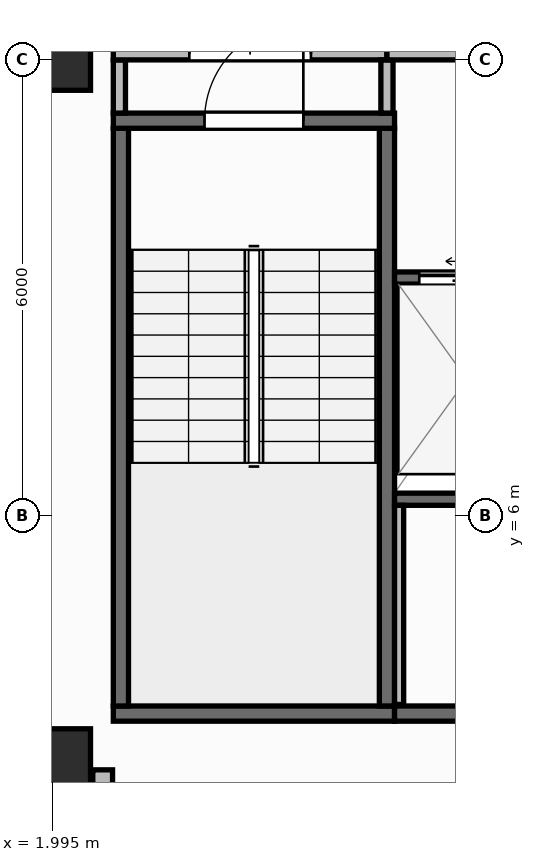
"""IFC4 building model, lengths in metres.
Left out: names, types, materials, properties, quantities, classifications, styles, units other than length and angle.
Written with IfcOpenShell. Run it as: python <this file> out.ifc"""

import sys

from ifc_helpers import new_model, si_unit, direction, frame, frame_2d, origin, origin_2d, place, context, subcontext, project, spatial, rectangle, extrude, element, fill, save


model = new_model("IFC4")
c1 = context("Model", 3, precision=1e-05, world=origin(), true_north=direction((0.0, 1.0)))
c2 = subcontext(c1, "Body", "Model", "MODEL_VIEW")
j1 = project(units=[si_unit("LENGTHUNIT", "METRE"), si_unit("PLANEANGLEUNIT", "RADIAN")], contexts=[c1])
p1 = place(None, origin())
s1 = spatial("IfcSite", under=j1, at=p1, CompositionType="ELEMENT")
p2 = place(p1, origin())
s2 = spatial("IfcBuilding", under=s1, at=p2, CompositionType="ELEMENT")
p3 = place(p2, frame((0.0, 0.0, 244.7)))
s3 = spatial("IfcBuildingStorey", under=s2, at=p3, CompositionType="ELEMENT", Elevation=244.7)
for number, where, z_axis, x_axis in (
    (1, (2.1, 2.8, 0.0), (0.0, 0.0, 1.0), (1.0, 0.0, 0.0)),
    (2, (2.1, 12.0, 0.0), (0.0, 0.0, 1.0), (1.0, 0.0, 0.0)),
):
    element("IfcColumn", number, at=place(p3, frame(where, z_axis=z_axis, x_axis=x_axis)), inside=s3, PredefinedType="COLUMN", context=c2, shape_type="SweptSolid", body=[
        extrude(rectangle(XDim=0.8, YDim=0.8, at=origin_2d()), origin(), (0.0, 0.0, 1.0), 3.95),
    ])
p4 = place(p3, frame((2.66, 2.66, 0.0), z_axis=(0.0, 0.0, 1.0), x_axis=(0.0, -1.0, 0.0)))
e3 = element("IfcWall", 3, at=p4, inside=s3, PredefinedType="STANDARD", context=c2, shape_type="SweptSolid", body=[
    extrude(rectangle(XDim=2.486, YDim=0.26, at=frame_2d((1.243, 0.0))), origin(), (0.0, 0.0, 1.0), 3.71),
])
p5 = place(p3, frame((2.66, 0.174, 0.0), z_axis=(0.0, 0.0, 1.0), x_axis=(0.996611813627, 0.082248969229, 0.0)))
e4 = element("IfcWall", 4, at=p5, inside=s3, PredefinedType="STANDARD", context=c2, shape_type="SweptSolid", body=[
    extrude(rectangle(XDim=41.019, YDim=0.26, at=frame_2d((20.51, 0.0))), origin(), (0.0, 0.0, 1.0), 3.71),
])
p6 = place(p5, frame((19.31, 0.0, 0.9)))
e5 = element("IfcOpeningElement", 5, at=p6, cuts=e4, PredefinedType="OPENING", context=c2, shape_type="SweptSolid", body=[
    extrude(rectangle(XDim=2.4, YDim=1.65, at=frame_2d((1.2, 0.825))), frame((0.0, 0.14, 0.0), z_axis=(0.0, -1.0, 0.0), x_axis=(1.0, 0.0, 0.0)), (0.0, 0.0, 1.0), 0.28),
])
p7 = place(p3, frame((2.8, 3.4, 0.0), z_axis=(0.0, 0.0, 1.0), x_axis=(1.0, 0.0, 0.0)))
e6 = element("IfcWall", 6, at=p7, inside=s3, PredefinedType="SHEAR", context=c2, shape_type="SweptSolid", body=[
    extrude(rectangle(XDim=3.7, YDim=0.2, at=frame_2d((1.85, 0.0))), origin(), (0.0, 0.0, 1.0), 3.71),
])
for number, where, z_axis, x_axis in (
    (7, (2.9, 3.5, 0.0), (0.0, 0.0, 1.0), (0.0, 1.0, 0.0)),
    (8, (6.4, 3.5, 0.0), (0.0, 0.0, 1.0), (0.0, 1.0, 0.0)),
):
    element("IfcWall", number, at=place(p3, frame(where, z_axis=z_axis, x_axis=x_axis)), inside=s3, PredefinedType="SHEAR", context=c2, shape_type="SweptSolid", body=[
        extrude(rectangle(XDim=7.6, YDim=0.2, at=frame_2d((3.8, 0.0))), origin(), (0.0, 0.0, 1.0), 3.71),
    ])
p8 = place(p3, frame((2.8, 11.2, 0.0), z_axis=(0.0, 0.0, 1.0), x_axis=(1.0, 0.0, 0.0)))
e9 = element("IfcWall", 9, at=p8, inside=s3, PredefinedType="SHEAR", context=c2, shape_type="SweptSolid", body=[
    extrude(rectangle(XDim=3.7, YDim=0.2, at=frame_2d((1.85, 0.0))), origin(), (0.0, 0.0, 1.0), 3.71),
])
p9 = place(p8, frame((1.2, 0.0, 0.0)))
e10 = element("IfcOpeningElement", 10, at=p9, cuts=e9, PredefinedType="OPENING", context=c2, shape_type="SweptSolid", body=[
    extrude(rectangle(XDim=1.3, YDim=2.15, at=frame_2d((0.65, 1.075))), frame((0.0, 0.11, 0.0), z_axis=(0.0, -1.0, 0.0), x_axis=(1.0, 0.0, 0.0)), (0.0, 0.0, 1.0), 0.22),
])
p10 = place(p3, frame((6.5, 3.4, 0.0), z_axis=(0.0, 0.0, 1.0), x_axis=(1.0, 0.0, 0.0)))
e11 = element("IfcWall", 11, at=p10, inside=s3, PredefinedType="SHEAR", context=c2, shape_type="SweptSolid", body=[
    extrude(rectangle(XDim=13.7, YDim=0.2, at=frame_2d((6.85, 0.0))), origin(), (0.0, 0.0, 1.0), 3.71),
])
p11 = place(p3, frame((6.5, 6.22, 0.0), z_axis=(0.0, 0.0, 1.0), x_axis=(1.0, 0.0, 0.0)))
e12 = element("IfcWall", 12, at=p11, inside=s3, PredefinedType="SHEAR", context=c2, shape_type="SweptSolid", body=[
    extrude(rectangle(XDim=12.11, YDim=0.16, at=frame_2d((6.055, 0.0))), origin(), (0.0, 0.0, 1.0), 3.71),
])
p12 = place(p3, frame((6.5, 9.13, 0.0), z_axis=(0.0, 0.0, 1.0), x_axis=(1.0, 0.0, 0.0)))
e13 = element("IfcWall", 13, at=p12, inside=s3, PredefinedType="SHEAR", context=c2, shape_type="SweptSolid", body=[
    extrude(rectangle(XDim=1.975, YDim=0.16, at=frame_2d((0.988, 0.0))), origin(), (0.0, 0.0, 1.0), 3.71),
])
p13 = place(p12, frame((0.325, 0.0, 0.0)))
e14 = element("IfcOpeningElement", 14, at=p13, cuts=e13, PredefinedType="OPENING", context=c2, shape_type="SweptSolid", body=[
    extrude(rectangle(XDim=1.25, YDim=2.15, at=frame_2d((0.625, 1.075))), frame((0.0, 0.09, 0.0), z_axis=(0.0, -1.0, 0.0), x_axis=(1.0, 0.0, 0.0)), (0.0, 0.0, 1.0), 0.18),
])
p14 = place(p3, frame((6.56, 3.52, 0.0), z_axis=(0.0, 0.0, 1.0), x_axis=(0.0, 1.0, 0.0)))
e15 = element("IfcWall", 15, at=p14, inside=s3, PredefinedType="PARTITIONING", context=c2, shape_type="SweptSolid", body=[
    extrude(rectangle(XDim=2.62, YDim=0.12, at=frame_2d((1.31, 0.0))), origin(), (0.0, 0.0, 1.0), 3.71),
])
p15 = place(p3, frame((2.88, 11.3, 0.0), z_axis=(0.0, 0.0, 1.0), x_axis=(0.0, 1.0, 0.0)))
e16 = element("IfcWall", 16, at=p15, inside=s3, PredefinedType="PARTITIONING", context=c2, shape_type="SweptSolid", body=[
    extrude(rectangle(XDim=0.7, YDim=0.16, at=frame_2d((0.35, 0.0))), origin(), (0.0, 0.0, 1.0), 3.71),
])
p16 = place(p3, frame((2.8, 12.08, 0.0), z_axis=(0.0, 0.0, 1.0), x_axis=(1.0, 0.0, 0.0)))
e17 = element("IfcWall", 17, at=p16, inside=s3, PredefinedType="PARTITIONING", context=c2, shape_type="SweptSolid", body=[
    extrude(rectangle(XDim=3.6, YDim=0.16, at=frame_2d((1.8, 0.0))), origin(), (0.0, 0.0, 1.0), 3.157),
])
p17 = place(p16, frame((1.0, 0.0, 0.0)))
e18 = element("IfcOpeningElement", 18, at=p17, cuts=e17, PredefinedType="OPENING", context=c2, shape_type="SweptSolid", body=[
    extrude(rectangle(XDim=1.6, YDim=2.05, at=frame_2d((0.8, 1.025))), frame((0.0, 0.09, 0.0), z_axis=(0.0, -1.0, 0.0), x_axis=(1.0, 0.0, 0.0)), (0.0, 0.0, 1.0), 0.18),
])
p18 = place(p3, frame((6.4, 11.3, 0.0), z_axis=(0.0, 0.0, 1.0), x_axis=(0.0, 1.0, 0.0)))
e19 = element("IfcWall", 19, at=p18, inside=s3, PredefinedType="PARTITIONING", context=c2, shape_type="SweptSolid", body=[
    extrude(rectangle(XDim=0.7, YDim=0.16, at=frame_2d((0.35, 0.0))), origin(), (0.0, 0.0, 1.0), 3.71),
])
p19 = place(p3, frame((6.4, 12.08, 0.0), z_axis=(0.0, 0.0, 1.0), x_axis=(1.0, 0.0, 0.0)))
e20 = element("IfcWall", 20, at=p19, inside=s3, PredefinedType="PARTITIONING", context=c2, shape_type="SweptSolid", body=[
    extrude(rectangle(XDim=6.18, YDim=0.16, at=frame_2d((3.09, 0.0))), origin(), (0.0, 0.0, 1.0), 3.157),
])
p20 = place(p19, frame((2.29, 0.0, 0.0)))
e21 = element("IfcOpeningElement", 21, at=p20, cuts=e20, PredefinedType="OPENING", context=c2, shape_type="SweptSolid", body=[
    extrude(rectangle(XDim=1.6, YDim=2.05, at=frame_2d((0.8, 1.025))), frame((0.0, 0.09, 0.0), z_axis=(0.0, -1.0, 0.0), x_axis=(1.0, 0.0, 0.0)), (0.0, 0.0, 1.0), 0.18),
])
p21 = place(p9, origin())
e22 = element("IfcDoor", 22, at=p21, inside=s3, OperationType="SINGLE_SWING_RIGHT", PredefinedType="DOOR", context=c2, shape_type="SweptSolid", body=[
    extrude(rectangle(XDim=1.3, YDim=2.15, at=frame_2d((0.65, 1.075))), frame((0.0, 0.025, 0.0), z_axis=(0.0, -1.0, 0.0), x_axis=(1.0, 0.0, 0.0)), (0.0, 0.0, 1.0), 0.05),
])
fill(e10, e22)
p22 = place(p13, origin())
e23 = element("IfcDoor", 23, at=p22, inside=s3, OperationType="SLIDING_TO_LEFT", PredefinedType="DOOR", context=c2, shape_type="SweptSolid", body=[
    extrude(rectangle(XDim=1.25, YDim=2.15, at=frame_2d((0.625, 1.075))), frame((0.0, 0.025, 0.0), z_axis=(0.0, -1.0, 0.0), x_axis=(1.0, 0.0, 0.0)), (0.0, 0.0, 1.0), 0.05),
])
fill(e14, e23)
p23 = place(p17, origin())
e24 = element("IfcDoor", 24, at=p23, inside=s3, OperationType="DOUBLE_DOOR_SINGLE_SWING", PredefinedType="DOOR", context=c2, shape_type="SweptSolid", body=[
    extrude(rectangle(XDim=1.6, YDim=2.05, at=frame_2d((0.8, 1.025))), frame((0.0, 0.025, 0.0), z_axis=(0.0, -1.0, 0.0), x_axis=(1.0, 0.0, 0.0)), (0.0, 0.0, 1.0), 0.05),
])
fill(e18, e24)
save(model, sys.argv[1])
